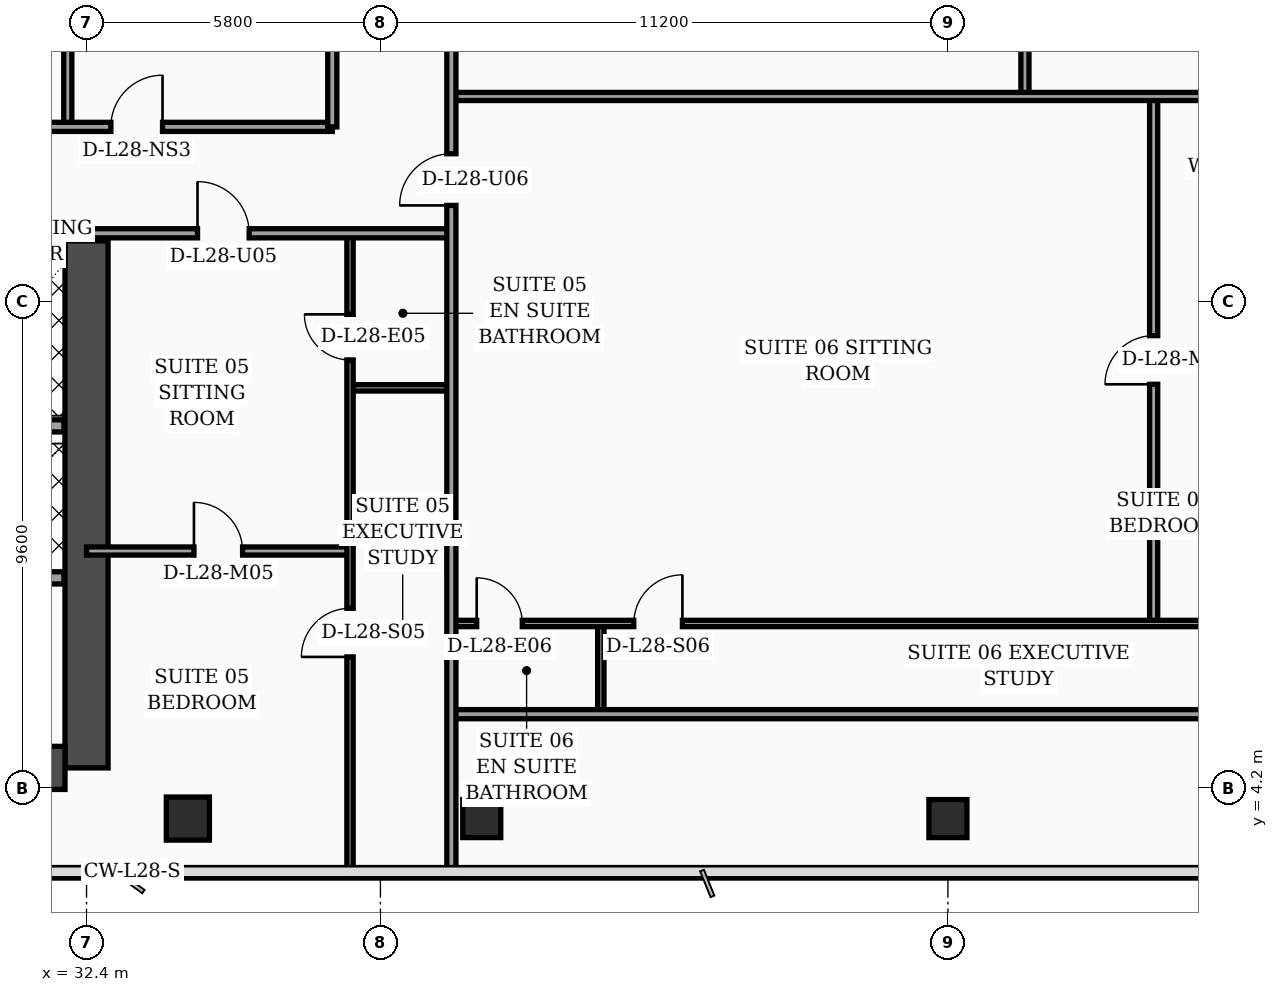
"""IFC4 building model, lengths in metres.
Left out: names, types, materials, properties, quantities, classifications, styles, units other than length and angle.
Written with IfcOpenShell. Run it as: python <this file> out.ifc"""

import sys

from ifc_helpers import new_model, si_unit, direction, frame, frame_2d, origin, origin_2d, place, context, subcontext, project, spatial, rectangle, hollow_rectangle, extrude, element, fill, save


model = new_model("IFC4")
c1 = context("Model", 3, precision=1e-05, world=origin(), true_north=direction((0.0, 1.0)))
c2 = subcontext(c1, "Body", "Model", "MODEL_VIEW")
j1 = project(units=[si_unit("LENGTHUNIT", "METRE"), si_unit("PLANEANGLEUNIT", "RADIAN")], contexts=[c1])
p1 = place(None, origin())
s1 = spatial("IfcSite", under=j1, at=p1, CompositionType="ELEMENT")
p2 = place(p1, origin())
s2 = spatial("IfcBuilding", under=s1, at=p2, CompositionType="ELEMENT")
p3 = place(p2, frame((0.0, 0.0, 116.4)))
s3 = spatial("IfcBuildingStorey", under=s2, at=p3, CompositionType="ELEMENT", Elevation=116.4)
p4 = place(p3, frame((32.4, 4.6, 0.0), z_axis=(0.0, 0.0, 1.0), x_axis=(0.0, 1.0, 0.0)))
e1 = element("IfcWall", 1, at=p4, inside=s3, PredefinedType="SHEAR", context=c2, shape_type="SweptSolid", body=[
    extrude(rectangle(XDim=10.4, YDim=0.85, at=frame_2d((5.2, 0.0))), origin(), (0.0, 0.0, 1.0), 3.56),
])
p5 = place(p3, frame((22.025, 15.0, 0.0), z_axis=(0.0, 0.0, 1.0), x_axis=(1.0, 0.0, 0.0)))
e2 = element("IfcWall", 2, at=p5, inside=s3, PredefinedType="SHEAR", context=c2, shape_type="SweptSolid", body=[
    extrude(rectangle(XDim=9.95, YDim=0.85, at=frame_2d((4.975, 0.0))), origin(), (0.0, 0.0, 1.0), 3.56),
])
p6 = place(p5, frame((4.88, 0.0, 0.0)))
e3 = element("IfcOpeningElement", 3, at=p6, cuts=e2, PredefinedType="OPENING", context=c2, shape_type="SweptSolid", body=[
    extrude(rectangle(XDim=1.1, YDim=2.2, at=frame_2d((0.55, 1.1))), frame((0.0, 0.435, 0.0), z_axis=(0.0, -1.0, 0.0), x_axis=(1.0, 0.0, 0.0)), (0.0, 0.0, 1.0), 0.87),
])
p7 = place(p3, frame((22.025, 4.6, 0.0), z_axis=(0.0, 0.0, 1.0), x_axis=(1.0, 0.0, 0.0)))
e4 = element("IfcWall", 4, at=p7, inside=s3, PredefinedType="SHEAR", context=c2, shape_type="SweptSolid", body=[
    extrude(rectangle(XDim=9.95, YDim=0.85, at=frame_2d((4.975, 0.0))), origin(), (0.0, 0.0, 1.0), 3.56),
])
p8 = place(p3, frame((34.4, 3.6, 0.0), z_axis=(0.0, 0.0, 1.0), x_axis=(1.0, 0.0, 0.0)))
e5 = element("IfcColumn", 5, at=p8, inside=s3, PredefinedType="COLUMN", context=c2, shape_type="SweptSolid", body=[
    extrude(hollow_rectangle(XDim=0.85, YDim=0.85, WallThickness=0.036, at=origin_2d()), origin(), (0.0, 0.0, 1.0), 3.56),
])
for number, where, z_axis, x_axis in (
    (6, (40.2, 3.6, 0.0), (0.0, 0.0, 1.0), (1.0, 0.0, 0.0)),
    (7, (49.4, 3.6, 0.0), (0.0, 0.0, 1.0), (1.0, 0.0, 0.0)),
):
    element("IfcColumn", number, at=place(p3, frame(where, z_axis=z_axis, x_axis=x_axis)), inside=s3, PredefinedType="COLUMN", context=c2, shape_type="SweptSolid", body=[
        extrude(hollow_rectangle(XDim=0.75, YDim=0.75, WallThickness=0.032, at=origin_2d()), origin(), (0.0, 0.0, 1.0), 3.56),
    ])
p9 = place(p3, frame((59.23, 5.505, 0.0), z_axis=(0.0, 0.0, 1.0), x_axis=(-0.300509063924, 0.953778958931, 0.0)))
e8 = element("IfcWall", 8, at=p9, inside=s3, PredefinedType="SOLIDWALL", context=c2, shape_type="SweptSolid", body=[
    extrude(rectangle(XDim=30.814, YDim=0.32, at=frame_2d((15.407, 0.0))), origin(), (0.0, 0.0, 1.0), 3.56),
])
p10 = place(p9, frame((18.796, 0.0, 0.0)))
e9 = element("IfcOpeningElement", 9, at=p10, cuts=e8, PredefinedType="OPENING", context=c2, shape_type="SweptSolid", body=[
    extrude(rectangle(XDim=1.4, YDim=2.25, at=frame_2d((0.7, 1.125))), frame((0.0, 0.17, 0.0), z_axis=(0.0, -1.0, 0.0), x_axis=(1.0, 0.0, 0.0)), (0.0, 0.0, 1.0), 0.34),
])
p11 = place(p9, frame((2.65, 0.0, 0.75)))
e10 = element("IfcOpeningElement", 10, at=p11, cuts=e8, PredefinedType="OPENING", context=c2, shape_type="SweptSolid", body=[
    extrude(rectangle(XDim=1.5, YDim=1.6, at=frame_2d((0.75, 0.8))), frame((0.0, 0.17, 0.0), z_axis=(0.0, -1.0, 0.0), x_axis=(1.0, 0.0, 0.0)), (0.0, 0.0, 1.0), 0.34),
])
p12 = place(p9, frame((4.7, 0.0, 0.75)))
e11 = element("IfcOpeningElement", 11, at=p12, cuts=e8, PredefinedType="OPENING", context=c2, shape_type="SweptSolid", body=[
    extrude(rectangle(XDim=1.5, YDim=1.6, at=frame_2d((0.75, 0.8))), frame((0.0, 0.17, 0.0), z_axis=(0.0, -1.0, 0.0), x_axis=(1.0, 0.0, 0.0)), (0.0, 0.0, 1.0), 0.34),
])
p13 = place(p9, frame((7.8, 0.0, 0.75)))
e12 = element("IfcOpeningElement", 12, at=p13, cuts=e8, PredefinedType="OPENING", context=c2, shape_type="SweptSolid", body=[
    extrude(rectangle(XDim=1.5, YDim=1.6, at=frame_2d((0.75, 0.8))), frame((0.0, 0.17, 0.0), z_axis=(0.0, -1.0, 0.0), x_axis=(1.0, 0.0, 0.0)), (0.0, 0.0, 1.0), 0.34),
])
p14 = place(p9, frame((10.9, 0.0, 0.75)))
e13 = element("IfcOpeningElement", 13, at=p14, cuts=e8, PredefinedType="OPENING", context=c2, shape_type="SweptSolid", body=[
    extrude(rectangle(XDim=1.5, YDim=1.6, at=frame_2d((0.75, 0.8))), frame((0.0, 0.17, 0.0), z_axis=(0.0, -1.0, 0.0), x_axis=(1.0, 0.0, 0.0)), (0.0, 0.0, 1.0), 0.34),
])
p15 = place(p9, frame((14.0, 0.0, 0.75)))
e14 = element("IfcOpeningElement", 14, at=p15, cuts=e8, PredefinedType="OPENING", context=c2, shape_type="SweptSolid", body=[
    extrude(rectangle(XDim=1.5, YDim=1.6, at=frame_2d((0.75, 0.8))), frame((0.0, 0.17, 0.0), z_axis=(0.0, -1.0, 0.0), x_axis=(1.0, 0.0, 0.0)), (0.0, 0.0, 1.0), 0.34),
])
p16 = place(p9, frame((16.55, 0.0, 0.75)))
e15 = element("IfcOpeningElement", 15, at=p16, cuts=e8, PredefinedType="OPENING", context=c2, shape_type="SweptSolid", body=[
    extrude(rectangle(XDim=1.5, YDim=1.6, at=frame_2d((0.75, 0.8))), frame((0.0, 0.17, 0.0), z_axis=(0.0, -1.0, 0.0), x_axis=(1.0, 0.0, 0.0)), (0.0, 0.0, 1.0), 0.34),
])
p17 = place(p9, frame((23.3, 0.0, 0.75)))
e16 = element("IfcOpeningElement", 16, at=p17, cuts=e8, PredefinedType="OPENING", context=c2, shape_type="SweptSolid", body=[
    extrude(rectangle(XDim=1.5, YDim=1.6, at=frame_2d((0.75, 0.8))), frame((0.0, 0.17, 0.0), z_axis=(0.0, -1.0, 0.0), x_axis=(1.0, 0.0, 0.0)), (0.0, 0.0, 1.0), 0.34),
])
p18 = place(p9, frame((27.45, 0.0, 0.75)))
e17 = element("IfcOpeningElement", 17, at=p18, cuts=e8, PredefinedType="OPENING", context=c2, shape_type="SweptSolid", body=[
    extrude(rectangle(XDim=1.5, YDim=1.6, at=frame_2d((0.75, 0.8))), frame((0.0, 0.17, 0.0), z_axis=(0.0, -1.0, 0.0), x_axis=(1.0, 0.0, 0.0)), (0.0, 0.0, 1.0), 0.34),
])
p19 = place(p3, frame((27.02, 11.35, 0.0), z_axis=(0.0, 0.0, 1.0), x_axis=(1.0, 0.0, 0.0)))
e18 = element("IfcWall", 18, at=p19, inside=s3, PredefinedType="SOLIDWALL", context=c2, shape_type="SweptSolid", body=[
    extrude(rectangle(XDim=4.935, YDim=0.24, at=frame_2d((2.468, 0.0))), origin(), (0.0, 0.0, 1.0), 3.56),
])
p20 = place(p19, frame((0.45, 0.0, 0.0)))
e19 = element("IfcOpeningElement", 19, at=p20, cuts=e18, PredefinedType="OPENING", context=c2, shape_type="SweptSolid", body=[
    extrude(rectangle(XDim=1.3, YDim=2.35, at=frame_2d((0.65, 1.175))), frame((0.0, 0.13, 0.0), z_axis=(0.0, -1.0, 0.0), x_axis=(1.0, 0.0, 0.0)), (0.0, 0.0, 1.0), 0.26),
])
p21 = place(p3, frame((27.02, 8.35, 0.0), z_axis=(0.0, 0.0, 1.0), x_axis=(1.0, 0.0, 0.0)))
e20 = element("IfcWall", 20, at=p21, inside=s3, PredefinedType="SOLIDWALL", context=c2, shape_type="SweptSolid", body=[
    extrude(rectangle(XDim=4.935, YDim=0.24, at=frame_2d((2.468, 0.0))), origin(), (0.0, 0.0, 1.0), 3.09),
])
p22 = place(p3, frame((37.6, 12.1, 0.0), z_axis=(0.0, 0.0, 1.0), x_axis=(1.0, 0.0, 0.0)))
e21 = element("IfcWall", 21, at=p22, inside=s3, PredefinedType="PARTITIONING", context=c2, shape_type="SweptSolid", body=[
    extrude(rectangle(XDim=2.0, YDim=0.125, at=frame_2d((1.0, 0.0))), origin(), (0.0, 0.0, 1.0), 3.56),
])
p23 = place(p3, frame((32.4, 8.88, 0.0), z_axis=(0.0, 0.0, 1.0), x_axis=(1.0, 0.0, 0.0)))
e22 = element("IfcWall", 22, at=p23, inside=s3, PredefinedType="PARTITIONING", context=c2, shape_type="SweptSolid", body=[
    extrude(rectangle(XDim=5.2, YDim=0.16, at=frame_2d((2.6, 0.0))), origin(), (0.0, 0.0, 1.0), 2.84),
])
p24 = place(p23, frame((2.12, 0.0, 0.0)))
e23 = element("IfcOpeningElement", 23, at=p24, cuts=e22, PredefinedType="OPENING", context=c2, shape_type="SweptSolid", body=[
    extrude(rectangle(XDim=0.96, YDim=2.2, at=frame_2d((0.48, 1.1))), frame((0.0, 0.09, 0.0), z_axis=(0.0, -1.0, 0.0), x_axis=(1.0, 0.0, 0.0)), (0.0, 0.0, 1.0), 0.18),
])
p25 = place(p3, frame((37.6, 2.44, 0.0), z_axis=(0.0, 0.0, 1.0), x_axis=(0.0, 1.0, 0.0)))
e24 = element("IfcWall", 24, at=p25, inside=s3, PredefinedType="PARTITIONING", context=c2, shape_type="SweptSolid", body=[
    extrude(rectangle(XDim=12.71, YDim=0.125, at=frame_2d((6.355, 0.0))), origin(), (0.0, 0.0, 1.0), 2.84),
])
p26 = place(p25, frame((4.35, 0.0, 0.0)))
e25 = element("IfcOpeningElement", 25, at=p26, cuts=e24, PredefinedType="OPENING", context=c2, shape_type="SweptSolid", body=[
    extrude(rectangle(XDim=0.96, YDim=2.2, at=frame_2d((0.48, 1.1))), frame((0.0, 0.073, 0.0), z_axis=(0.0, -1.0, 0.0), x_axis=(1.0, 0.0, 0.0)), (0.0, 0.0, 1.0), 0.145),
])
p27 = place(p25, frame((10.21, 0.0, 0.0)))
e26 = element("IfcOpeningElement", 26, at=p27, cuts=e24, PredefinedType="OPENING", context=c2, shape_type="SweptSolid", body=[
    extrude(rectangle(XDim=0.9, YDim=2.15, at=frame_2d((0.45, 1.075))), frame((0.0, 0.073, 0.0), z_axis=(0.0, -1.0, 0.0), x_axis=(1.0, 0.0, 0.0)), (0.0, 0.0, 1.0), 0.145),
])
p28 = place(p3, frame((32.4, 15.15, 0.0), z_axis=(0.0, 0.0, 1.0), x_axis=(1.0, 0.0, 0.0)))
e27 = element("IfcWall", 27, at=p28, inside=s3, PredefinedType="PARTITIONING", context=c2, shape_type="SweptSolid", body=[
    extrude(rectangle(XDim=7.2, YDim=0.18, at=frame_2d((3.6, 0.0))), origin(), (0.0, 0.0, 1.0), 2.84),
])
p29 = place(p28, frame((2.19, 0.0, 0.0)))
e28 = element("IfcOpeningElement", 28, at=p29, cuts=e27, PredefinedType="OPENING", context=c2, shape_type="SweptSolid", body=[
    extrude(rectangle(XDim=1.02, YDim=2.2, at=frame_2d((0.51, 1.1))), frame((0.0, 0.1, 0.0), z_axis=(0.0, -1.0, 0.0), x_axis=(1.0, 0.0, 0.0)), (0.0, 0.0, 1.0), 0.2),
])
p30 = place(p3, frame((32.03, 17.25, 0.0), z_axis=(0.0, 0.0, 1.0), x_axis=(0.0, 1.0, 0.0)))
e29 = element("IfcWall", 29, at=p30, inside=s3, PredefinedType="PARTITIONING", context=c2, shape_type="SweptSolid", body=[
    extrude(rectangle(XDim=13.04, YDim=0.16, at=frame_2d((6.52, 0.0))), origin(), (0.0, 0.0, 1.0), 2.84),
])
p31 = place(p3, frame((21.5, 17.25, 0.0), z_axis=(0.0, 0.0, 1.0), x_axis=(1.0, 0.0, 0.0)))
e30 = element("IfcWall", 30, at=p31, inside=s3, PredefinedType="PARTITIONING", context=c2, shape_type="SweptSolid", body=[
    extrude(rectangle(XDim=15.75, YDim=0.18, at=frame_2d((7.875, 0.0))), origin(), (0.0, 0.0, 1.0), 2.84),
])
p32 = place(p31, frame((0.95, 0.0, 0.0)))
e31 = element("IfcOpeningElement", 31, at=p32, cuts=e30, PredefinedType="OPENING", context=c2, shape_type="SweptSolid", body=[
    extrude(rectangle(XDim=1.02, YDim=2.2, at=frame_2d((0.51, 1.1))), frame((0.0, 0.1, 0.0), z_axis=(0.0, -1.0, 0.0), x_axis=(1.0, 0.0, 0.0)), (0.0, 0.0, 1.0), 0.2),
])
p33 = place(p31, frame((6.82, 0.0, 0.0)))
e32 = element("IfcOpeningElement", 32, at=p33, cuts=e30, PredefinedType="OPENING", context=c2, shape_type="SweptSolid", body=[
    extrude(rectangle(XDim=1.02, YDim=2.2, at=frame_2d((0.51, 1.1))), frame((0.0, 0.1, 0.0), z_axis=(0.0, -1.0, 0.0), x_axis=(1.0, 0.0, 0.0)), (0.0, 0.0, 1.0), 0.2),
])
p34 = place(p31, frame((11.38, 0.0, 0.0)))
e33 = element("IfcOpeningElement", 33, at=p34, cuts=e30, PredefinedType="OPENING", context=c2, shape_type="SweptSolid", body=[
    extrude(rectangle(XDim=1.02, YDim=2.2, at=frame_2d((0.51, 1.1))), frame((0.0, 0.1, 0.0), z_axis=(0.0, -1.0, 0.0), x_axis=(1.0, 0.0, 0.0)), (0.0, 0.0, 1.0), 0.2),
])
p35 = place(p3, frame((37.25, 17.25, 0.0), z_axis=(0.0, 0.0, 1.0), x_axis=(0.0, 1.0, 0.0)))
e34 = element("IfcWall", 34, at=p35, inside=s3, PredefinedType="PARTITIONING", context=c2, shape_type="SweptSolid", body=[
    extrude(rectangle(XDim=15.95, YDim=0.18, at=frame_2d((7.975, 0.0))), origin(), (0.0, 0.0, 1.0), 2.84),
])
p36 = place(p3, frame((42.55, 5.66, 0.0), z_axis=(0.0, 0.0, 1.0), x_axis=(0.0, 1.0, 0.0)))
e35 = element("IfcWall", 35, at=p36, inside=s3, PredefinedType="PARTITIONING", context=c2, shape_type="SweptSolid", body=[
    extrude(rectangle(XDim=1.79, YDim=0.125, at=frame_2d((0.895, 0.0))), origin(), (0.0, 0.0, 1.0), 3.56),
])
p37 = place(p3, frame((53.46, 7.45, 0.0), z_axis=(0.0, 0.0, 1.0), x_axis=(0.0, 1.0, 0.0)))
e36 = element("IfcWall", 36, at=p37, inside=s3, PredefinedType="PARTITIONING", context=c2, shape_type="SweptSolid", body=[
    extrude(rectangle(XDim=10.4, YDim=0.16, at=frame_2d((5.2, 0.0))), origin(), (0.0, 0.0, 1.0), 3.04),
])
p38 = place(p37, frame((4.72, 0.0, 0.0)))
e37 = element("IfcOpeningElement", 37, at=p38, cuts=e36, PredefinedType="OPENING", context=c2, shape_type="SweptSolid", body=[
    extrude(rectangle(XDim=0.96, YDim=2.2, at=frame_2d((0.48, 1.1))), frame((0.0, 0.09, 0.0), z_axis=(0.0, -1.0, 0.0), x_axis=(1.0, 0.0, 0.0)), (0.0, 0.0, 1.0), 0.18),
])
p39 = place(p3, frame((39.6, 7.45, 0.0), z_axis=(0.0, 0.0, 1.0), x_axis=(1.0, 0.0, 0.0)))
e38 = element("IfcWall", 38, at=p39, inside=s3, PredefinedType="PARTITIONING", context=c2, shape_type="SweptSolid", body=[
    extrude(rectangle(XDim=18.96, YDim=0.125, at=frame_2d((9.48, 0.0))), origin(), (0.0, 0.0, 1.0), 2.84),
])
p40 = place(p39, frame((0.5, 0.0, 0.0)))
e39 = element("IfcOpeningElement", 39, at=p40, cuts=e38, PredefinedType="OPENING", context=c2, shape_type="SweptSolid", body=[
    extrude(rectangle(XDim=0.9, YDim=2.15, at=frame_2d((0.45, 1.075))), frame((0.0, 0.073, 0.0), z_axis=(0.0, -1.0, 0.0), x_axis=(1.0, 0.0, 0.0)), (0.0, 0.0, 1.0), 0.145),
])
p41 = place(p39, frame((3.6, 0.0, 0.0)))
e40 = element("IfcOpeningElement", 40, at=p41, cuts=e38, PredefinedType="OPENING", context=c2, shape_type="SweptSolid", body=[
    extrude(rectangle(XDim=0.96, YDim=2.2, at=frame_2d((0.48, 1.1))), frame((0.0, 0.073, 0.0), z_axis=(0.0, -1.0, 0.0), x_axis=(1.0, 0.0, 0.0)), (0.0, 0.0, 1.0), 0.145),
])
p42 = place(p3, frame((39.6, 5.66, 0.0), z_axis=(0.0, 0.0, 1.0), x_axis=(1.0, 0.0, 0.0)))
e41 = element("IfcWall", 41, at=p42, inside=s3, PredefinedType="PARTITIONING", context=c2, shape_type="SweptSolid", body=[
    extrude(rectangle(XDim=16.4, YDim=0.18, at=frame_2d((8.2, 0.0))), origin(), (0.0, 0.0, 1.0), 2.84),
])
p43 = place(p3, frame((50.92, 17.85, 0.0), z_axis=(0.0, 0.0, 1.0), x_axis=(0.0, 1.0, 0.0)))
e42 = element("IfcWall", 42, at=p43, inside=s3, PredefinedType="PARTITIONING", context=c2, shape_type="SweptSolid", body=[
    extrude(rectangle(XDim=5.74, YDim=0.16, at=frame_2d((2.87, 0.0))), origin(), (0.0, 0.0, 1.0), 2.84),
])
p44 = place(p43, frame((2.39, 0.0, 0.0)))
e43 = element("IfcOpeningElement", 43, at=p44, cuts=e42, PredefinedType="OPENING", context=c2, shape_type="SweptSolid", body=[
    extrude(rectangle(XDim=0.96, YDim=2.2, at=frame_2d((0.48, 1.1))), frame((0.0, 0.09, 0.0), z_axis=(0.0, -1.0, 0.0), x_axis=(1.0, 0.0, 0.0)), (0.0, 0.0, 1.0), 0.18),
])
p45 = place(p3, frame((39.6, 17.85, 0.0), z_axis=(0.0, 0.0, 1.0), x_axis=(1.0, 0.0, 0.0)))
e44 = element("IfcWall", 44, at=p45, inside=s3, PredefinedType="PARTITIONING", context=c2, shape_type="SweptSolid", body=[
    extrude(rectangle(XDim=15.68, YDim=0.16, at=frame_2d((7.84, 0.0))), origin(), (0.0, 0.0, 1.0), 2.84),
])
p46 = place(p3, frame((39.6, 2.44, 0.0), z_axis=(0.0, 0.0, 1.0), x_axis=(0.0, 1.0, 0.0)))
e45 = element("IfcWall", 45, at=p46, inside=s3, PredefinedType="PARTITIONING", context=c2, shape_type="SweptSolid", body=[
    extrude(rectangle(XDim=31.04, YDim=0.18, at=frame_2d((15.52, 0.0))), origin(), (0.0, 0.0, 1.0), 2.84),
])
p47 = place(p46, frame((13.26, 0.0, 0.0)))
e46 = element("IfcOpeningElement", 46, at=p47, cuts=e45, PredefinedType="OPENING", context=c2, shape_type="SweptSolid", body=[
    extrude(rectangle(XDim=1.02, YDim=2.2, at=frame_2d((0.51, 1.1))), frame((0.0, 0.1, 0.0), z_axis=(0.0, -1.0, 0.0), x_axis=(1.0, 0.0, 0.0)), (0.0, 0.0, 1.0), 0.2),
])
p48 = place(p46, frame((17.77, 0.0, 0.0)))
e47 = element("IfcOpeningElement", 47, at=p48, cuts=e45, PredefinedType="OPENING", context=c2, shape_type="SweptSolid", body=[
    extrude(rectangle(XDim=1.02, YDim=2.2, at=frame_2d((0.51, 1.1))), frame((0.0, 0.1, 0.0), z_axis=(0.0, -1.0, 0.0), x_axis=(1.0, 0.0, 0.0)), (0.0, 0.0, 1.0), 0.2),
])
p49 = place(p46, frame((25.58, 0.0, 0.0)))
e48 = element("IfcOpeningElement", 48, at=p49, cuts=e45, PredefinedType="OPENING", context=c2, shape_type="SweptSolid", body=[
    extrude(rectangle(XDim=1.02, YDim=2.2, at=frame_2d((0.51, 1.1))), frame((0.0, 0.1, 0.0), z_axis=(0.0, -1.0, 0.0), x_axis=(1.0, 0.0, 0.0)), (0.0, 0.0, 1.0), 0.2),
])
p50 = place(p24, origin())
e49 = element("IfcDoor", 49, at=p50, inside=s3, OperationType="SINGLE_SWING_LEFT", PredefinedType="DOOR", context=c2, shape_type="SweptSolid", body=[
    extrude(rectangle(XDim=0.96, YDim=2.2, at=frame_2d((0.48, 1.1))), frame((0.0, 0.025, 0.0), z_axis=(0.0, -1.0, 0.0), x_axis=(1.0, 0.0, 0.0)), (0.0, 0.0, 1.0), 0.05),
])
fill(e23, e49)
p51 = place(p26, origin())
e50 = element("IfcDoor", 50, at=p51, inside=s3, OperationType="SINGLE_SWING_LEFT", PredefinedType="DOOR", context=c2, shape_type="SweptSolid", body=[
    extrude(rectangle(XDim=0.96, YDim=2.2, at=frame_2d((0.48, 1.1))), frame((0.0, 0.025, 0.0), z_axis=(0.0, -1.0, 0.0), x_axis=(1.0, 0.0, 0.0)), (0.0, 0.0, 1.0), 0.05),
])
fill(e25, e50)
p52 = place(p27, origin())
e51 = element("IfcDoor", 51, at=p52, inside=s3, OperationType="SINGLE_SWING_RIGHT", PredefinedType="DOOR", context=c2, shape_type="SweptSolid", body=[
    extrude(rectangle(XDim=0.9, YDim=2.15, at=frame_2d((0.45, 1.075))), frame((0.0, 0.025, 0.0), z_axis=(0.0, -1.0, 0.0), x_axis=(1.0, 0.0, 0.0)), (0.0, 0.0, 1.0), 0.05),
])
fill(e26, e51)
p53 = place(p29, origin())
e52 = element("IfcDoor", 52, at=p53, inside=s3, OperationType="SINGLE_SWING_LEFT", PredefinedType="DOOR", context=c2, shape_type="SweptSolid", body=[
    extrude(rectangle(XDim=1.02, YDim=2.2, at=frame_2d((0.51, 1.1))), frame((0.0, 0.025, 0.0), z_axis=(0.0, -1.0, 0.0), x_axis=(1.0, 0.0, 0.0)), (0.0, 0.0, 1.0), 0.05),
])
fill(e28, e52)
p54 = place(p34, origin())
e53 = element("IfcDoor", 53, at=p54, inside=s3, OperationType="SINGLE_SWING_RIGHT", PredefinedType="DOOR", context=c2, shape_type="SweptSolid", body=[
    extrude(rectangle(XDim=1.02, YDim=2.2, at=frame_2d((0.51, 1.1))), frame((0.0, 0.025, 0.0), z_axis=(0.0, -1.0, 0.0), x_axis=(1.0, 0.0, 0.0)), (0.0, 0.0, 1.0), 0.05),
])
fill(e33, e53)
p55 = place(p38, origin())
e54 = element("IfcDoor", 54, at=p55, inside=s3, OperationType="SINGLE_SWING_LEFT", PredefinedType="DOOR", context=c2, shape_type="SweptSolid", body=[
    extrude(rectangle(XDim=0.96, YDim=2.2, at=frame_2d((0.48, 1.1))), frame((0.0, 0.025, 0.0), z_axis=(0.0, -1.0, 0.0), x_axis=(1.0, 0.0, 0.0)), (0.0, 0.0, 1.0), 0.05),
])
fill(e37, e54)
p56 = place(p40, origin())
e55 = element("IfcDoor", 55, at=p56, inside=s3, OperationType="SINGLE_SWING_LEFT", PredefinedType="DOOR", context=c2, shape_type="SweptSolid", body=[
    extrude(rectangle(XDim=0.9, YDim=2.15, at=frame_2d((0.45, 1.075))), frame((0.0, 0.025, 0.0), z_axis=(0.0, -1.0, 0.0), x_axis=(1.0, 0.0, 0.0)), (0.0, 0.0, 1.0), 0.05),
])
fill(e39, e55)
p57 = place(p41, origin())
e56 = element("IfcDoor", 56, at=p57, inside=s3, OperationType="SINGLE_SWING_RIGHT", PredefinedType="DOOR", context=c2, shape_type="SweptSolid", body=[
    extrude(rectangle(XDim=0.96, YDim=2.2, at=frame_2d((0.48, 1.1))), frame((0.0, 0.025, 0.0), z_axis=(0.0, -1.0, 0.0), x_axis=(1.0, 0.0, 0.0)), (0.0, 0.0, 1.0), 0.05),
])
fill(e40, e56)
p58 = place(p47, origin())
e57 = element("IfcDoor", 57, at=p58, inside=s3, OperationType="SINGLE_SWING_LEFT", PredefinedType="DOOR", context=c2, shape_type="SweptSolid", body=[
    extrude(rectangle(XDim=1.02, YDim=2.2, at=frame_2d((0.51, 1.1))), frame((0.0, 0.025, 0.0), z_axis=(0.0, -1.0, 0.0), x_axis=(1.0, 0.0, 0.0)), (0.0, 0.0, 1.0), 0.05),
])
fill(e46, e57)
save(model, sys.argv[1])
